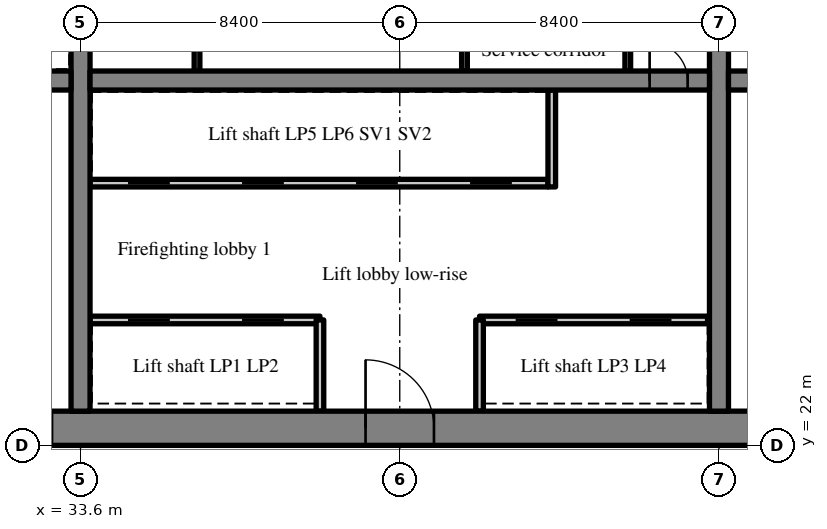
"""IFC4 building model, lengths in metres.
Left out: names, types, materials, properties, quantities, classifications, styles, units other than length and angle.
Written with IfcOpenShell. Run it as: python <this file> out.ifc"""

import sys

from ifc_helpers import new_model, si_unit, direction, frame, frame_2d, origin, place, context, subcontext, project, spatial, rectangle, extrude, source, transform, mapped, element, fill, save


model = new_model("IFC4")
c1 = context("Model", 3, precision=1e-05, world=origin(), true_north=direction((0.0, 1.0)))
c2 = subcontext(c1, "Body", "Model", "MODEL_VIEW")
j1 = project(units=[si_unit("LENGTHUNIT", "METRE"), si_unit("PLANEANGLEUNIT", "RADIAN")], contexts=[c1])
p1 = place(None, origin())
s1 = spatial("IfcSite", under=j1, at=p1, CompositionType="ELEMENT")
p2 = place(p1, origin())
s2 = spatial("IfcBuilding", under=s1, at=p2, CompositionType="ELEMENT")
p3 = place(p2, frame((0.0, 0.0, 118.0)))
s3 = spatial("IfcBuildingStorey", under=s2, at=p3, CompositionType="ELEMENT", Elevation=118.0)
m1 = source(origin(), c2, "Body", "SweptSolid", [
    extrude(rectangle(XDim=50.4, YDim=0.9, at=frame_2d((25.2, 0.0))), origin(), (0.0, 0.0, 1.0), 3.52),
])
p4 = place(p3, frame((25.2, 22.45, 0.0), z_axis=(0.0, 0.0, 1.0), x_axis=(1.0, 0.0, 0.0)))
e1 = element("IfcWall", 1, at=p4, inside=s3, PredefinedType="SHEAR", context=c2, shape_type="MappedRepresentation", body=[
    mapped(m1, transform((0.0, 0.0, 0.0), scale=1.0)),
])
m2 = source(origin(), c2, "Body", "SweptSolid", [
    extrude(rectangle(XDim=1.8, YDim=2.1, at=frame_2d((0.9, 1.05))), frame((0.0, 0.46, 0.0), z_axis=(0.0, -1.0, 0.0), x_axis=(1.0, 0.0, 0.0)), (0.0, 0.0, 1.0), 0.92),
])
p5 = place(p4, frame((15.9, 0.0, 0.0)))
e2 = element("IfcOpeningElement", 2, at=p5, cuts=e1, PredefinedType="OPENING", context=c2, shape_type="MappedRepresentation", body=[
    mapped(m2, transform((0.0, 0.0, 0.0), scale=1.0)),
])
m3 = source(origin(), c2, "Body", "SweptSolid", [
    extrude(rectangle(XDim=1.2, YDim=2.1, at=frame_2d((0.6, 1.05))), frame((0.0, 0.46, 0.0), z_axis=(0.0, -1.0, 0.0), x_axis=(1.0, 0.0, 0.0)), (0.0, 0.0, 1.0), 0.92),
])
p6 = place(p4, frame((26.975, 0.0, 0.0)))
e3 = element("IfcOpeningElement", 3, at=p6, cuts=e1, PredefinedType="OPENING", context=c2, shape_type="MappedRepresentation", body=[
    mapped(m3, transform((0.0, 0.0, 0.0), scale=1.0)),
])
m4 = source(origin(), c2, "Body", "SweptSolid", [
    extrude(rectangle(XDim=0.9, YDim=2.1, at=frame_2d((0.45, 1.05))), frame((0.0, 0.46, 0.0), z_axis=(0.0, -1.0, 0.0), x_axis=(1.0, 0.0, 0.0)), (0.0, 0.0, 1.0), 0.92),
])
p7 = place(p4, frame((33.75, 0.0, 0.0)))
e4 = element("IfcOpeningElement", 4, at=p7, cuts=e1, PredefinedType="OPENING", context=c2, shape_type="MappedRepresentation", body=[
    mapped(m4, transform((0.0, 0.0, 0.0), scale=1.0)),
])
p8 = place(p4, frame((30.75, 0.0, 0.0)))
e5 = element("IfcOpeningElement", 5, at=p8, cuts=e1, PredefinedType="OPENING", context=c2, shape_type="MappedRepresentation", body=[
    mapped(m4, transform((0.0, 0.0, 0.0), scale=1.0)),
])
p9 = place(p4, frame((39.788, 0.0, 0.0)))
e6 = element("IfcOpeningElement", 6, at=p9, cuts=e1, PredefinedType="OPENING", context=c2, shape_type="MappedRepresentation", body=[
    mapped(m4, transform((0.0, 0.0, 0.0), scale=1.0)),
])
p10 = place(p4, frame((36.762, 0.0, 0.0)))
e7 = element("IfcOpeningElement", 7, at=p10, cuts=e1, PredefinedType="OPENING", context=c2, shape_type="MappedRepresentation", body=[
    mapped(m4, transform((0.0, 0.0, 0.0), scale=1.0)),
])
p11 = place(p4, frame((6.45, 0.0, 0.0)))
e8 = element("IfcOpeningElement", 8, at=p11, cuts=e1, PredefinedType="OPENING", context=c2, shape_type="MappedRepresentation", body=[
    mapped(m3, transform((0.0, 0.0, 0.0), scale=1.0)),
])
p12 = place(p4, frame((47.775, 0.0, 0.0)))
e9 = element("IfcOpeningElement", 9, at=p12, cuts=e1, PredefinedType="OPENING", context=c2, shape_type="MappedRepresentation", body=[
    mapped(m3, transform((0.0, 0.0, 0.0), scale=1.0)),
])
m5 = source(origin(), c2, "Body", "SweptSolid", [
    extrude(rectangle(XDim=18.2, YDim=0.5, at=frame_2d((9.1, 0.0))), origin(), (0.0, 0.0, 1.0), 3.52),
])
p13 = place(p3, frame((33.6, 22.9, 0.0), z_axis=(0.0, 0.0, 1.0), x_axis=(0.0, 1.0, 0.0)))
e10 = element("IfcWall", 10, at=p13, inside=s3, PredefinedType="SHEAR", context=c2, shape_type="MappedRepresentation", body=[
    mapped(m5, transform((0.0, 0.0, 0.0), scale=1.0)),
])
m6 = source(origin(), c2, "Body", "SweptSolid", [
    extrude(rectangle(XDim=1.1, YDim=2.1, at=frame_2d((0.55, 1.05))), frame((0.0, 0.26, 0.0), z_axis=(0.0, -1.0, 0.0), x_axis=(1.0, 0.0, 0.0)), (0.0, 0.0, 1.0), 0.52),
])
p14 = place(p13, frame((12.55, 0.0, 0.0)))
e11 = element("IfcOpeningElement", 11, at=p14, cuts=e10, PredefinedType="OPENING", context=c2, shape_type="MappedRepresentation", body=[
    mapped(m6, transform((0.0, 0.0, 0.0), scale=1.0)),
])
p15 = place(p3, frame((50.4, 22.9, 0.0), z_axis=(0.0, 0.0, 1.0), x_axis=(0.0, 1.0, 0.0)))
e12 = element("IfcWall", 12, at=p15, inside=s3, PredefinedType="SHEAR", context=c2, shape_type="MappedRepresentation", body=[
    mapped(m5, transform((0.0, 0.0, 0.0), scale=1.0)),
])
p16 = place(p15, frame((12.55, 0.0, 0.0)))
e13 = element("IfcOpeningElement", 13, at=p16, cuts=e12, PredefinedType="OPENING", context=c2, shape_type="MappedRepresentation", body=[
    mapped(m6, transform((0.0, 0.0, 0.0), scale=1.0)),
])
m7 = source(origin(), c2, "Body", "SweptSolid", [
    extrude(rectangle(XDim=7.25, YDim=0.5, at=frame_2d((3.625, 0.0))), origin(), (0.0, 0.0, 1.0), 3.52),
])
p17 = place(p3, frame((26.1, 31.6, 0.0), z_axis=(0.0, 0.0, 1.0), x_axis=(1.0, 0.0, 0.0)))
e14 = element("IfcWall", 14, at=p17, inside=s3, PredefinedType="SHEAR", context=c2, shape_type="MappedRepresentation", body=[
    mapped(m7, transform((0.0, 0.0, 0.0), scale=1.0)),
])
p18 = place(p17, frame((5.6, 0.0, 0.0)))
e15 = element("IfcOpeningElement", 15, at=p18, cuts=e14, PredefinedType="OPENING", context=c2, shape_type="MappedRepresentation", body=[
    mapped(m6, transform((0.0, 0.0, 0.0), scale=1.0)),
])
m8 = source(origin(), c2, "Body", "SweptSolid", [
    extrude(rectangle(XDim=16.3, YDim=0.5, at=frame_2d((8.15, 0.0))), origin(), (0.0, 0.0, 1.0), 3.52),
])
p19 = place(p3, frame((33.85, 31.6, 0.0), z_axis=(0.0, 0.0, 1.0), x_axis=(1.0, 0.0, 0.0)))
e16 = element("IfcWall", 16, at=p19, inside=s3, PredefinedType="SHEAR", context=c2, shape_type="MappedRepresentation", body=[
    mapped(m8, transform((0.0, 0.0, 0.0), scale=1.0)),
])
m9 = source(origin(), c2, "Body", "SweptSolid", [
    extrude(rectangle(XDim=1.0, YDim=2.1, at=frame_2d((0.5, 1.05))), frame((0.0, 0.26, 0.0), z_axis=(0.0, -1.0, 0.0), x_axis=(1.0, 0.0, 0.0)), (0.0, 0.0, 1.0), 0.52),
])
p20 = place(p19, frame((14.725, 0.0, 0.0)))
e17 = element("IfcOpeningElement", 17, at=p20, cuts=e16, PredefinedType="OPENING", context=c2, shape_type="MappedRepresentation", body=[
    mapped(m9, transform((0.0, 0.0, 0.0), scale=1.0)),
])
m10 = source(origin(), c2, "Body", "SweptSolid", [
    extrude(rectangle(XDim=16.3, YDim=0.5, at=frame_2d((8.15, 0.0))), origin(), (0.0, 0.0, 1.0), 3.52),
])
p21 = place(p3, frame((50.65, 31.6, 0.0), z_axis=(0.0, 0.0, 1.0), x_axis=(1.0, 0.0, 0.0)))
e18 = element("IfcWall", 18, at=p21, inside=s3, PredefinedType="SHEAR", context=c2, shape_type="MappedRepresentation", body=[
    mapped(m10, transform((0.0, 0.0, 0.0), scale=1.0)),
])
p22 = place(p21, frame((0.575, 0.0, 0.0)))
e19 = element("IfcOpeningElement", 19, at=p22, cuts=e18, PredefinedType="OPENING", context=c2, shape_type="MappedRepresentation", body=[
    mapped(m9, transform((0.0, 0.0, 0.0), scale=1.0)),
])
m11 = source(origin(), c2, "Body", "SweptSolid", [
    extrude(rectangle(XDim=6.05, YDim=0.2, at=frame_2d((3.025, 0.0))), origin(), (0.0, 0.0, 1.0), 3.52),
])
p23 = place(p3, frame((33.85, 25.3, 0.0), z_axis=(0.0, 0.0, 1.0), x_axis=(1.0, 0.0, 0.0)))
e20 = element("IfcWall", 20, at=p23, inside=s3, PredefinedType="SOLIDWALL", context=c2, shape_type="MappedRepresentation", body=[
    mapped(m11, transform((0.0, 0.0, 0.0), scale=1.0)),
])
m12 = source(origin(), c2, "Body", "SweptSolid", [
    extrude(rectangle(XDim=1.1, YDim=2.1, at=frame_2d((0.55, 1.05))), frame((0.0, 0.11, 0.0), z_axis=(0.0, -1.0, 0.0), x_axis=(1.0, 0.0, 0.0)), (0.0, 0.0, 1.0), 0.22),
])
p24 = place(p23, frame((1.0, 0.0, 0.0)))
e21 = element("IfcOpeningElement", 21, at=p24, cuts=e20, PredefinedType="OPENING", context=c2, shape_type="MappedRepresentation", body=[
    mapped(m12, transform((0.0, 0.0, 0.0), scale=1.0)),
])
p25 = place(p23, frame((4.0, 0.0, 0.0)))
e22 = element("IfcOpeningElement", 22, at=p25, cuts=e20, PredefinedType="OPENING", context=c2, shape_type="MappedRepresentation", body=[
    mapped(m12, transform((0.0, 0.0, 0.0), scale=1.0)),
])
m13 = source(origin(), c2, "Body", "SweptSolid", [
    extrude(rectangle(XDim=6.0, YDim=0.2, at=frame_2d((3.0, 0.0))), origin(), (0.0, 0.0, 1.0), 3.52),
])
p26 = place(p3, frame((44.1, 25.3, 0.0), z_axis=(0.0, 0.0, 1.0), x_axis=(1.0, 0.0, 0.0)))
e23 = element("IfcWall", 23, at=p26, inside=s3, PredefinedType="SOLIDWALL", context=c2, shape_type="MappedRepresentation", body=[
    mapped(m13, transform((0.0, 0.0, 0.0), scale=1.0)),
])
p27 = place(p26, frame((0.95, 0.0, 0.0)))
e24 = element("IfcOpeningElement", 24, at=p27, cuts=e23, PredefinedType="OPENING", context=c2, shape_type="MappedRepresentation", body=[
    mapped(m12, transform((0.0, 0.0, 0.0), scale=1.0)),
])
p28 = place(p26, frame((3.95, 0.0, 0.0)))
e25 = element("IfcOpeningElement", 25, at=p28, cuts=e23, PredefinedType="OPENING", context=c2, shape_type="MappedRepresentation", body=[
    mapped(m12, transform((0.0, 0.0, 0.0), scale=1.0)),
])
m14 = source(origin(), c2, "Body", "SweptSolid", [
    extrude(rectangle(XDim=12.05, YDim=0.2, at=frame_2d((6.025, 0.0))), origin(), (0.0, 0.0, 1.0), 3.52),
])
p29 = place(p3, frame((33.85, 28.9, 0.0), z_axis=(0.0, 0.0, 1.0), x_axis=(1.0, 0.0, 0.0)))
e26 = element("IfcWall", 26, at=p29, inside=s3, PredefinedType="SOLIDWALL", context=c2, shape_type="MappedRepresentation", body=[
    mapped(m14, transform((0.0, 0.0, 0.0), scale=1.0)),
])
p30 = place(p29, frame((1.0, 0.0, 0.0)))
e27 = element("IfcOpeningElement", 27, at=p30, cuts=e26, PredefinedType="OPENING", context=c2, shape_type="MappedRepresentation", body=[
    mapped(m12, transform((0.0, 0.0, 0.0), scale=1.0)),
])
p31 = place(p29, frame((4.0, 0.0, 0.0)))
e28 = element("IfcOpeningElement", 28, at=p31, cuts=e26, PredefinedType="OPENING", context=c2, shape_type="MappedRepresentation", body=[
    mapped(m12, transform((0.0, 0.0, 0.0), scale=1.0)),
])
p32 = place(p29, frame((7.0, 0.0, 0.0)))
e29 = element("IfcOpeningElement", 29, at=p32, cuts=e26, PredefinedType="OPENING", context=c2, shape_type="MappedRepresentation", body=[
    mapped(m12, transform((0.0, 0.0, 0.0), scale=1.0)),
])
p33 = place(p29, frame((10.0, 0.0, 0.0)))
e30 = element("IfcOpeningElement", 30, at=p33, cuts=e26, PredefinedType="OPENING", context=c2, shape_type="MappedRepresentation", body=[
    mapped(m12, transform((0.0, 0.0, 0.0), scale=1.0)),
])
m15 = source(origin(), c2, "Body", "SweptSolid", [
    extrude(rectangle(XDim=2.4, YDim=0.2, at=frame_2d((1.2, 0.0))), origin(), (0.0, 0.0, 1.0), 3.52),
])
for number, where, z_axis, x_axis in (
    (31, (39.9, 22.9, 0.0), (0.0, 0.0, 1.0), (0.0, 1.0, 0.0)),
    (32, (44.1, 22.9, 0.0), (0.0, 0.0, 1.0), (0.0, 1.0, 0.0)),
):
    element("IfcWall", number, at=place(p3, frame(where, z_axis=z_axis, x_axis=x_axis)), inside=s3, PredefinedType="SOLIDWALL", context=c2, shape_type="MappedRepresentation", body=[
        mapped(m15, transform((0.0, 0.0, 0.0), scale=1.0)),
    ])
m16 = source(origin(), c2, "Body", "SweptSolid", [
    extrude(rectangle(XDim=2.55, YDim=0.2, at=frame_2d((1.275, 0.0))), origin(), (0.0, 0.0, 1.0), 3.52),
])
p34 = place(p3, frame((46.0, 28.8, 0.0), z_axis=(0.0, 0.0, 1.0), x_axis=(0.0, 1.0, 0.0)))
e33 = element("IfcWall", 33, at=p34, inside=s3, PredefinedType="SOLIDWALL", context=c2, shape_type="MappedRepresentation", body=[
    mapped(m16, transform((0.0, 0.0, 0.0), scale=1.0)),
])
m17 = source(origin(), c2, "Body", "SweptSolid", [
    extrude(rectangle(XDim=3.15, YDim=0.15, at=frame_2d((1.575, 0.0))), origin(), (0.0, 0.0, 1.0), 3.52),
])
for number, where, z_axis, x_axis in (
    (34, (48.0, 31.85, 0.0), (0.0, 0.0, 1.0), (0.0, 1.0, 0.0)),
    (35, (36.665, 31.85, 0.0), (0.0, 0.0, 1.0), (0.0, 1.0, 0.0)),
    (36, (43.703, 31.85, 0.0), (0.0, 0.0, 1.0), (0.0, 1.0, 0.0)),
):
    element("IfcWall", number, at=place(p3, frame(where, z_axis=z_axis, x_axis=x_axis)), inside=s3, PredefinedType="PARTITIONING", context=c2, shape_type="MappedRepresentation", body=[
        mapped(m17, transform((0.0, 0.0, 0.0), scale=1.0)),
    ])
m18 = source(origin(), c2, "Body", "SweptSolid", [
    extrude(rectangle(XDim=1.8, YDim=2.1, at=frame_2d((0.9, 1.05))), frame((0.0, 0.375, 0.0), z_axis=(0.0, -1.0, 0.0), x_axis=(1.0, 0.0, 0.0)), (0.0, 0.0, 1.0), 0.05),
])
p35 = place(p5, origin())
e37 = element("IfcDoor", 37, at=p35, inside=s3, OperationType="DOUBLE_DOOR_SINGLE_SWING", PredefinedType="DOOR", context=c2, shape_type="MappedRepresentation", body=[
    mapped(m18, transform((0.0, 0.0, 0.0), scale=1.0)),
])
fill(e2, e37)
m19 = source(origin(), c2, "Body", "SweptSolid", [
    extrude(rectangle(XDim=1.0, YDim=2.1, at=frame_2d((0.5, 1.05))), frame((0.0, 0.025, 0.0), z_axis=(0.0, -1.0, 0.0), x_axis=(1.0, 0.0, 0.0)), (0.0, 0.0, 1.0), 0.05),
])
p36 = place(p20, origin())
e38 = element("IfcDoor", 38, at=p36, inside=s3, OperationType="SINGLE_SWING_LEFT", PredefinedType="DOOR", context=c2, shape_type="MappedRepresentation", body=[
    mapped(m19, transform((0.0, 0.0, 0.0), scale=1.0)),
])
fill(e17, e38)
m20 = source(origin(), c2, "Body", "SweptSolid", [
    extrude(rectangle(XDim=1.1, YDim=2.1, at=frame_2d((0.55, 1.05))), frame((0.0, 0.025, 0.0), z_axis=(0.0, -1.0, 0.0), x_axis=(1.0, 0.0, 0.0)), (0.0, 0.0, 1.0), 0.05),
])
p37 = place(p24, origin())
e39 = element("IfcDoor", 39, at=p37, inside=s3, OperationType="SLIDING_TO_LEFT", PredefinedType="DOOR", context=c2, shape_type="MappedRepresentation", body=[
    mapped(m20, transform((0.0, 0.0, 0.0), scale=1.0)),
])
fill(e21, e39)
p38 = place(p25, origin())
e40 = element("IfcDoor", 40, at=p38, inside=s3, OperationType="SLIDING_TO_RIGHT", PredefinedType="DOOR", context=c2, shape_type="MappedRepresentation", body=[
    mapped(m20, transform((0.0, 0.0, 0.0), scale=1.0)),
])
fill(e22, e40)
p39 = place(p27, origin())
e41 = element("IfcDoor", 41, at=p39, inside=s3, OperationType="SLIDING_TO_LEFT", PredefinedType="DOOR", context=c2, shape_type="MappedRepresentation", body=[
    mapped(m20, transform((0.0, 0.0, 0.0), scale=1.0)),
])
fill(e24, e41)
p40 = place(p28, origin())
e42 = element("IfcDoor", 42, at=p40, inside=s3, OperationType="SLIDING_TO_RIGHT", PredefinedType="DOOR", context=c2, shape_type="MappedRepresentation", body=[
    mapped(m20, transform((0.0, 0.0, 0.0), scale=1.0)),
])
fill(e25, e42)
p41 = place(p30, origin())
e43 = element("IfcDoor", 43, at=p41, inside=s3, OperationType="SLIDING_TO_LEFT", PredefinedType="DOOR", context=c2, shape_type="MappedRepresentation", body=[
    mapped(m20, transform((0.0, 0.0, 0.0), scale=1.0)),
])
fill(e27, e43)
p42 = place(p31, origin())
e44 = element("IfcDoor", 44, at=p42, inside=s3, OperationType="SLIDING_TO_RIGHT", PredefinedType="DOOR", context=c2, shape_type="MappedRepresentation", body=[
    mapped(m20, transform((0.0, 0.0, 0.0), scale=1.0)),
])
fill(e28, e44)
p43 = place(p32, origin())
e45 = element("IfcDoor", 45, at=p43, inside=s3, OperationType="SLIDING_TO_LEFT", PredefinedType="DOOR", context=c2, shape_type="MappedRepresentation", body=[
    mapped(m20, transform((0.0, 0.0, 0.0), scale=1.0)),
])
fill(e29, e45)
p44 = place(p33, origin())
e46 = element("IfcDoor", 46, at=p44, inside=s3, OperationType="SLIDING_TO_RIGHT", PredefinedType="DOOR", context=c2, shape_type="MappedRepresentation", body=[
    mapped(m20, transform((0.0, 0.0, 0.0), scale=1.0)),
])
fill(e30, e46)
save(model, sys.argv[1])
